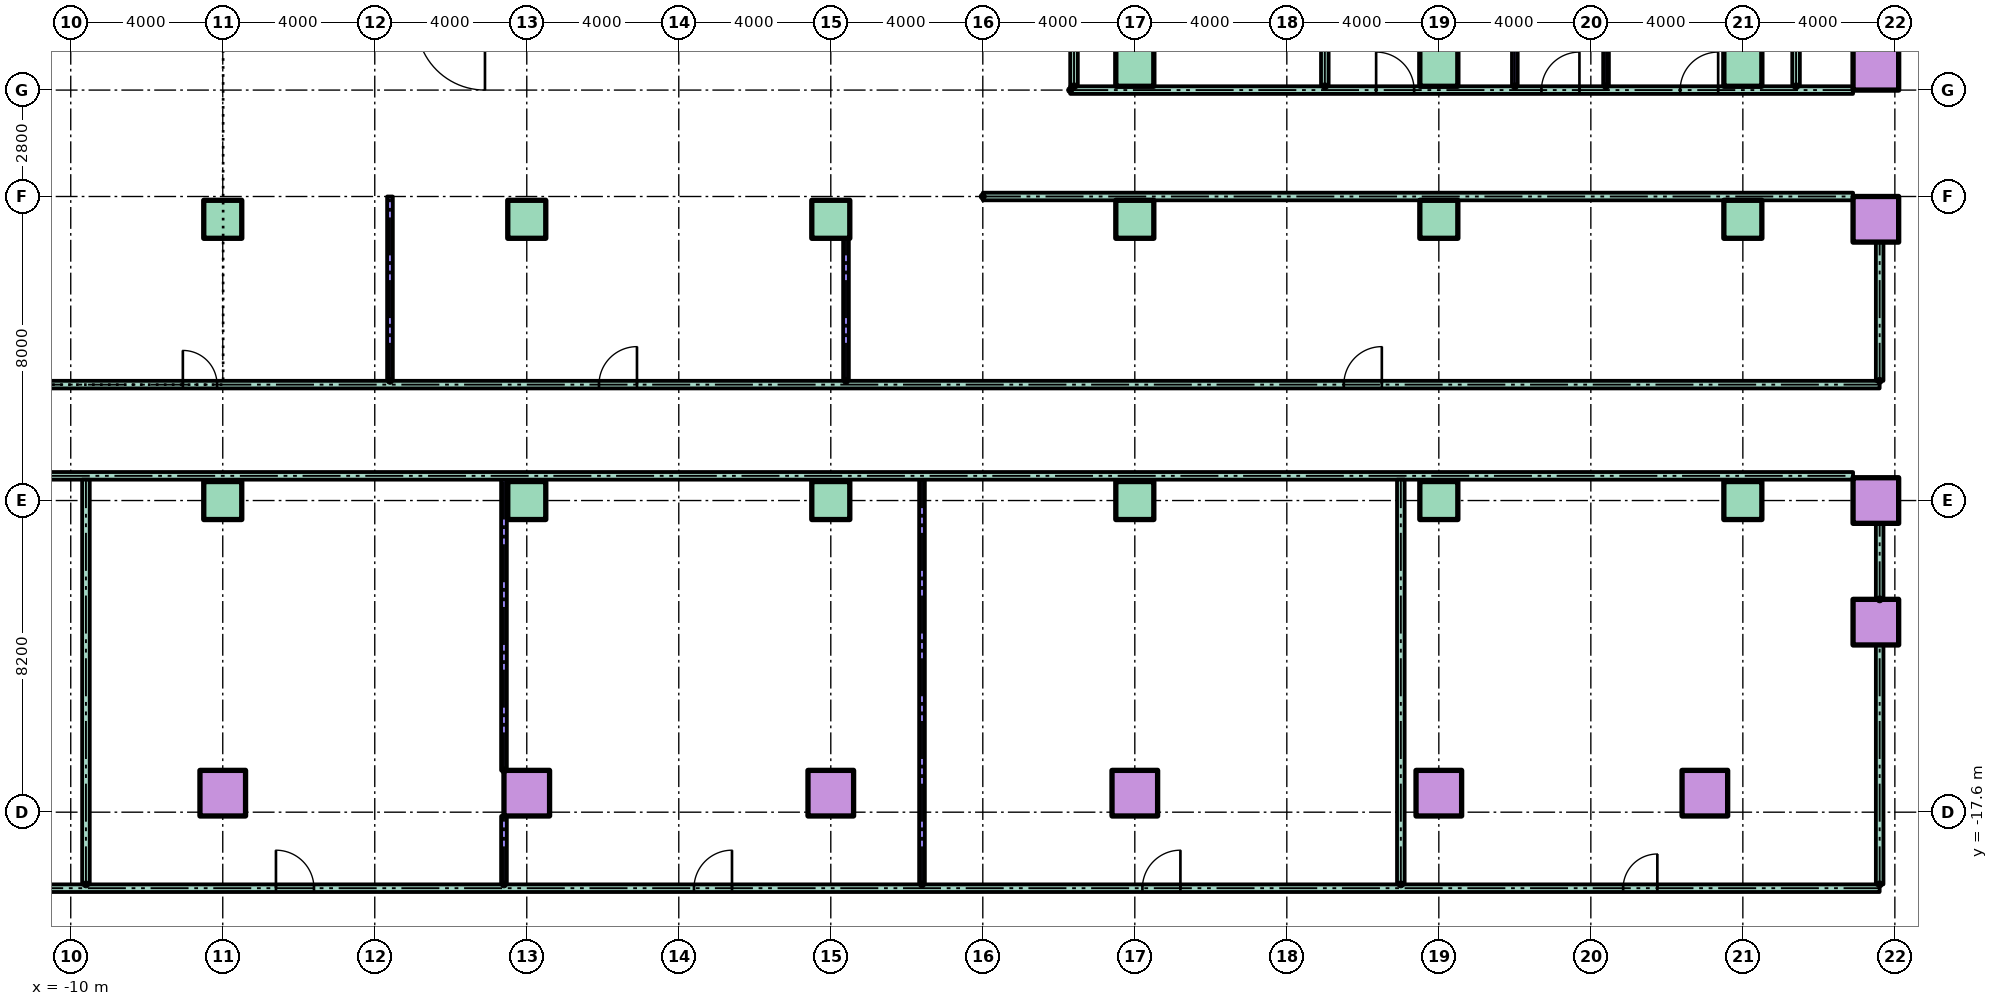
"""IFC4 building model, lengths in metres.
Left out: names, types, materials, properties, quantities, classifications, styles, units other than length and angle.
Written with IfcOpenShell. Run it as: python <this file> out.ifc"""

import sys

from ifc_helpers import new_model, si_unit, direction, frame, frame_2d, origin, origin_2d, place, context, subcontext, project, spatial, rectangle, hollow_rectangle, extrude, element, fill, save


model = new_model("IFC4")
c1 = context("Model", 3, precision=1e-05, world=origin(), true_north=direction((0.0, 1.0)))
c2 = subcontext(c1, "Body", "Model", "MODEL_VIEW")
j1 = project(units=[si_unit("LENGTHUNIT", "METRE"), si_unit("PLANEANGLEUNIT", "RADIAN")], contexts=[c1])
p1 = place(None, origin())
s1 = spatial("IfcSite", under=j1, at=p1, CompositionType="ELEMENT")
p2 = place(p1, origin())
s2 = spatial("IfcBuilding", under=s1, at=p2, CompositionType="ELEMENT")
p3 = place(p2, frame((0.0, 0.0, 18.0)))
s3 = spatial("IfcBuildingStorey", under=s2, at=p3, CompositionType="ELEMENT", Elevation=18.0)
for number, where in (
    (1, (-6.0, -17.1, 0.0)),
    (2, (2.0, -17.1, 0.0)),
    (3, (10.0, -17.1, 0.0)),
    (4, (18.0, -17.1, 0.0)),
    (5, (26.0, -17.1, 0.0)),
    (6, (33.0, -17.1, 0.0)),
    (7, (37.5, -12.6, 0.0)),
):
    element("IfcColumn", number, at=place(p3, frame(where)), inside=s3, PredefinedType="COLUMN", context=c2, shape_type="SweptSolid", body=[
        extrude(hollow_rectangle(XDim=1.2, YDim=1.2, WallThickness=0.06, at=origin_2d()), origin(), (0.0, 0.0, 1.0), 4.0),
    ])
for number, where in (
    (8, (-6.0, -9.4, 0.0)),
    (9, (2.0, -9.4, 0.0)),
    (10, (10.0, -9.4, 0.0)),
    (11, (18.0, -9.4, 0.0)),
    (12, (26.0, -9.4, 0.0)),
    (13, (34.0, -9.4, 0.0)),
):
    element("IfcColumn", number, at=place(p3, frame(where)), inside=s3, PredefinedType="COLUMN", context=c2, shape_type="SweptSolid", body=[
        extrude(rectangle(XDim=1.0, YDim=1.0, at=origin_2d()), origin(), (0.0, 0.0, 1.0), 4.0),
    ])
p4 = place(p3, frame((37.5, -9.4, 0.0)))
e14 = element("IfcColumn", 14, at=p4, inside=s3, PredefinedType="COLUMN", context=c2, shape_type="SweptSolid", body=[
    extrude(hollow_rectangle(XDim=1.2, YDim=1.2, WallThickness=0.06, at=origin_2d()), origin(), (0.0, 0.0, 1.0), 4.0),
])
for number, where in (
    (15, (-6.0, -2.0, 0.0)),
    (16, (2.0, -2.0, 0.0)),
    (17, (10.0, -2.0, 0.0)),
    (18, (18.0, -2.0, 0.0)),
    (19, (26.0, -2.0, 0.0)),
    (20, (34.0, -2.0, 0.0)),
):
    element("IfcColumn", number, at=place(p3, frame(where)), inside=s3, PredefinedType="COLUMN", context=c2, shape_type="SweptSolid", body=[
        extrude(rectangle(XDim=1.0, YDim=1.0, at=origin_2d()), origin(), (0.0, 0.0, 1.0), 4.0),
    ])
p5 = place(p3, frame((37.5, -2.0, 0.0)))
e21 = element("IfcColumn", 21, at=p5, inside=s3, PredefinedType="COLUMN", context=c2, shape_type="SweptSolid", body=[
    extrude(hollow_rectangle(XDim=1.2, YDim=1.2, WallThickness=0.06, at=origin_2d()), origin(), (0.0, 0.0, 1.0), 4.0),
])
for number, where in (
    (22, (18.0, 2.0, 0.0)),
    (23, (26.0, 2.0, 0.0)),
    (24, (34.0, 2.0, 0.0)),
):
    element("IfcColumn", number, at=place(p3, frame(where)), inside=s3, PredefinedType="COLUMN", context=c2, shape_type="SweptSolid", body=[
        extrude(rectangle(XDim=1.0, YDim=1.0, at=origin_2d()), origin(), (0.0, 0.0, 1.0), 4.0),
    ])
p6 = place(p3, frame((37.5, 2.0, 0.0)))
e25 = element("IfcColumn", 25, at=p6, inside=s3, PredefinedType="COLUMN", context=c2, shape_type="SweptSolid", body=[
    extrude(hollow_rectangle(XDim=1.2, YDim=1.2, WallThickness=0.06, at=origin_2d()), origin(), (0.0, 0.0, 1.0), 4.0),
])
p7 = place(p3, frame((-37.6, -19.6, 0.0)))
e26 = element("IfcWall", 26, at=p7, inside=s3, PredefinedType="PARTITIONING", context=c2, shape_type="SweptSolid", body=[
    extrude(rectangle(XDim=75.2, YDim=0.2, at=frame_2d((37.6, 0.0))), origin(), (0.0, 0.0, 1.0), 3.7),
])
p8 = place(p7, frame((2.58, 0.0, 0.0)))
e27 = element("IfcOpeningElement", 27, at=p8, cuts=e26, PredefinedType="OPENING", context=c2, shape_type="SweptSolid", body=[
    extrude(rectangle(XDim=1.0, YDim=2.1, at=frame_2d((0.5, 1.05))), frame((0.0, 0.11, 0.0), z_axis=(0.0, -1.0, 0.0), x_axis=(1.0, 0.0, 0.0)), (0.0, 0.0, 1.0), 0.22),
])
p9 = place(p7, frame((10.42, 0.0, 0.0)))
e28 = element("IfcOpeningElement", 28, at=p9, cuts=e26, PredefinedType="OPENING", context=c2, shape_type="SweptSolid", body=[
    extrude(rectangle(XDim=1.0, YDim=2.1, at=frame_2d((0.5, 1.05))), frame((0.0, 0.11, 0.0), z_axis=(0.0, -1.0, 0.0), x_axis=(1.0, 0.0, 0.0)), (0.0, 0.0, 1.0), 0.22),
])
p10 = place(p7, frame((16.58, 0.0, 0.0)))
e29 = element("IfcOpeningElement", 29, at=p10, cuts=e26, PredefinedType="OPENING", context=c2, shape_type="SweptSolid", body=[
    extrude(rectangle(XDim=1.0, YDim=2.1, at=frame_2d((0.5, 1.05))), frame((0.0, 0.11, 0.0), z_axis=(0.0, -1.0, 0.0), x_axis=(1.0, 0.0, 0.0)), (0.0, 0.0, 1.0), 0.22),
])
p11 = place(p7, frame((24.42, 0.0, 0.0)))
e30 = element("IfcOpeningElement", 30, at=p11, cuts=e26, PredefinedType="OPENING", context=c2, shape_type="SweptSolid", body=[
    extrude(rectangle(XDim=1.0, YDim=2.1, at=frame_2d((0.5, 1.05))), frame((0.0, 0.11, 0.0), z_axis=(0.0, -1.0, 0.0), x_axis=(1.0, 0.0, 0.0)), (0.0, 0.0, 1.0), 0.22),
])
p12 = place(p7, frame((33.0, 0.0, 0.0)))
e31 = element("IfcOpeningElement", 31, at=p12, cuts=e26, PredefinedType="OPENING", context=c2, shape_type="SweptSolid", body=[
    extrude(rectangle(XDim=1.0, YDim=2.1, at=frame_2d((0.5, 1.05))), frame((0.0, 0.11, 0.0), z_axis=(0.0, -1.0, 0.0), x_axis=(1.0, 0.0, 0.0)), (0.0, 0.0, 1.0), 0.22),
])
p13 = place(p7, frame((44.0, 0.0, 0.0)))
e32 = element("IfcOpeningElement", 32, at=p13, cuts=e26, PredefinedType="OPENING", context=c2, shape_type="SweptSolid", body=[
    extrude(rectangle(XDim=1.0, YDim=2.1, at=frame_2d((0.5, 1.05))), frame((0.0, 0.11, 0.0), z_axis=(0.0, -1.0, 0.0), x_axis=(1.0, 0.0, 0.0)), (0.0, 0.0, 1.0), 0.22),
])
p14 = place(p7, frame((55.8, 0.0, 0.0)))
e33 = element("IfcOpeningElement", 33, at=p14, cuts=e26, PredefinedType="OPENING", context=c2, shape_type="SweptSolid", body=[
    extrude(rectangle(XDim=1.0, YDim=2.1, at=frame_2d((0.5, 1.05))), frame((0.0, 0.11, 0.0), z_axis=(0.0, -1.0, 0.0), x_axis=(1.0, 0.0, 0.0)), (0.0, 0.0, 1.0), 0.22),
])
p15 = place(p7, frame((68.45, 0.0, 0.0)))
e34 = element("IfcOpeningElement", 34, at=p15, cuts=e26, PredefinedType="OPENING", context=c2, shape_type="SweptSolid", body=[
    extrude(rectangle(XDim=0.9, YDim=2.1, at=frame_2d((0.45, 1.05))), frame((0.0, 0.11, 0.0), z_axis=(0.0, -1.0, 0.0), x_axis=(1.0, 0.0, 0.0)), (0.0, 0.0, 1.0), 0.22),
])
p16 = place(p3, frame((-36.9, -8.75, 0.0)))
e35 = element("IfcWall", 35, at=p16, inside=s3, PredefinedType="PARTITIONING", context=c2, shape_type="SweptSolid", body=[
    extrude(rectangle(XDim=73.8, YDim=0.2, at=frame_2d((36.9, 0.0))), origin(), (0.0, 0.0, 1.0), 3.7),
])
p17 = place(p3, frame((-37.6, -6.35, 0.0)))
e36 = element("IfcWall", 36, at=p17, inside=s3, PredefinedType="PARTITIONING", context=c2, shape_type="SweptSolid", body=[
    extrude(rectangle(XDim=75.2, YDim=0.2, at=frame_2d((37.6, 0.0))), origin(), (0.0, 0.0, 1.0), 3.7),
])
p18 = place(p17, frame((7.5, 0.0, 0.0)))
e37 = element("IfcOpeningElement", 37, at=p18, cuts=e36, PredefinedType="OPENING", context=c2, shape_type="SweptSolid", body=[
    extrude(rectangle(XDim=1.0, YDim=2.1, at=frame_2d((0.5, 1.05))), frame((0.0, 0.11, 0.0), z_axis=(0.0, -1.0, 0.0), x_axis=(1.0, 0.0, 0.0)), (0.0, 0.0, 1.0), 0.22),
])
p19 = place(p17, frame((20.55, 0.0, 0.0)))
e38 = element("IfcOpeningElement", 38, at=p19, cuts=e36, PredefinedType="OPENING", context=c2, shape_type="SweptSolid", body=[
    extrude(rectangle(XDim=0.9, YDim=2.1, at=frame_2d((0.45, 1.05))), frame((0.0, 0.11, 0.0), z_axis=(0.0, -1.0, 0.0), x_axis=(1.0, 0.0, 0.0)), (0.0, 0.0, 1.0), 0.22),
])
p20 = place(p17, frame((30.55, 0.0, 0.0)))
e39 = element("IfcOpeningElement", 39, at=p20, cuts=e36, PredefinedType="OPENING", context=c2, shape_type="SweptSolid", body=[
    extrude(rectangle(XDim=0.9, YDim=2.1, at=frame_2d((0.45, 1.05))), frame((0.0, 0.11, 0.0), z_axis=(0.0, -1.0, 0.0), x_axis=(1.0, 0.0, 0.0)), (0.0, 0.0, 1.0), 0.22),
])
p21 = place(p17, frame((41.5, 0.0, 0.0)))
e40 = element("IfcOpeningElement", 40, at=p21, cuts=e36, PredefinedType="OPENING", context=c2, shape_type="SweptSolid", body=[
    extrude(rectangle(XDim=1.0, YDim=2.1, at=frame_2d((0.5, 1.05))), frame((0.0, 0.11, 0.0), z_axis=(0.0, -1.0, 0.0), x_axis=(1.0, 0.0, 0.0)), (0.0, 0.0, 1.0), 0.22),
])
p22 = place(p17, frame((61.1, 0.0, 0.0)))
e41 = element("IfcOpeningElement", 41, at=p22, cuts=e36, PredefinedType="OPENING", context=c2, shape_type="SweptSolid", body=[
    extrude(rectangle(XDim=1.0, YDim=2.1, at=frame_2d((0.5, 1.05))), frame((0.0, 0.11, 0.0), z_axis=(0.0, -1.0, 0.0), x_axis=(1.0, 0.0, 0.0)), (0.0, 0.0, 1.0), 0.22),
])
p23 = place(p3, frame((14.0, -1.4, 0.0)))
e42 = element("IfcWall", 42, at=p23, inside=s3, PredefinedType="PARTITIONING", context=c2, shape_type="SweptSolid", body=[
    extrude(rectangle(XDim=22.9, YDim=0.2, at=frame_2d((11.45, 0.0))), origin(), (0.0, 0.0, 1.0), 3.7),
])
p24 = place(p3, frame((16.3, 1.4, 0.0)))
e43 = element("IfcWall", 43, at=p24, inside=s3, PredefinedType="PARTITIONING", context=c2, shape_type="SweptSolid", body=[
    extrude(rectangle(XDim=20.6, YDim=0.2, at=frame_2d((10.3, 0.0))), origin(), (0.0, 0.0, 1.0), 3.7),
])
p25 = place(p24, frame((8.05, 0.0, 0.0)))
e44 = element("IfcOpeningElement", 44, at=p25, cuts=e43, PredefinedType="OPENING", context=c2, shape_type="SweptSolid", body=[
    extrude(rectangle(XDim=1.0, YDim=2.1, at=frame_2d((0.5, 1.05))), frame((0.0, 0.11, 0.0), z_axis=(0.0, -1.0, 0.0), x_axis=(1.0, 0.0, 0.0)), (0.0, 0.0, 1.0), 0.22),
])
p26 = place(p24, frame((12.4, 0.0, 0.0)))
e45 = element("IfcOpeningElement", 45, at=p26, cuts=e43, PredefinedType="OPENING", context=c2, shape_type="SweptSolid", body=[
    extrude(rectangle(XDim=1.0, YDim=2.1, at=frame_2d((0.5, 1.05))), frame((0.0, 0.11, 0.0), z_axis=(0.0, -1.0, 0.0), x_axis=(1.0, 0.0, 0.0)), (0.0, 0.0, 1.0), 0.22),
])
p27 = place(p24, frame((16.05, 0.0, 0.0)))
e46 = element("IfcOpeningElement", 46, at=p27, cuts=e43, PredefinedType="OPENING", context=c2, shape_type="SweptSolid", body=[
    extrude(rectangle(XDim=1.0, YDim=2.1, at=frame_2d((0.5, 1.05))), frame((0.0, 0.11, 0.0), z_axis=(0.0, -1.0, 0.0), x_axis=(1.0, 0.0, 0.0)), (0.0, 0.0, 1.0), 0.22),
])
p28 = place(p3, frame((-9.6, -19.5, 0.0), z_axis=(0.0, 0.0, 1.0), x_axis=(0.0, 1.0, 0.0)))
e47 = element("IfcWall", 47, at=p28, inside=s3, PredefinedType="PARTITIONING", context=c2, shape_type="SweptSolid", body=[
    extrude(rectangle(XDim=10.65, YDim=0.2, at=frame_2d((5.325, 0.0))), origin(), (0.0, 0.0, 1.0), 3.7),
])
p29 = place(p3, frame((-1.6, -6.25, 0.0), z_axis=(0.0, 0.0, 1.0), x_axis=(0.0, 1.0, 0.0)))
e48 = element("IfcWall", 48, at=p29, inside=s3, PredefinedType="PARTITIONING", context=c2, shape_type="SweptSolid", body=[
    extrude(rectangle(XDim=4.85, YDim=0.15, at=frame_2d((2.425, 0.0))), origin(), (0.0, 0.0, 1.0), 3.7),
])
p30 = place(p3, frame((1.4, -19.5, 0.0), z_axis=(0.0, 0.0, 1.0), x_axis=(0.0, 1.0, 0.0)))
e49 = element("IfcWall", 49, at=p30, inside=s3, PredefinedType="PARTITIONING", context=c2, shape_type="SweptSolid", body=[
    extrude(rectangle(XDim=1.8, YDim=0.15, at=frame_2d((0.9, 0.0))), origin(), (0.0, 0.0, 1.0), 3.7),
])
p31 = place(p3, frame((1.4, -16.5, 0.0), z_axis=(0.0, 0.0, 1.0), x_axis=(0.0, 1.0, 0.0)))
e50 = element("IfcWall", 50, at=p31, inside=s3, PredefinedType="PARTITIONING", context=c2, shape_type="SweptSolid", body=[
    extrude(rectangle(XDim=7.65, YDim=0.15, at=frame_2d((3.825, 0.0))), origin(), (0.0, 0.0, 1.0), 3.7),
])
p32 = place(p3, frame((10.4, -6.25, 0.0), z_axis=(0.0, 0.0, 1.0), x_axis=(0.0, 1.0, 0.0)))
e51 = element("IfcWall", 51, at=p32, inside=s3, PredefinedType="PARTITIONING", context=c2, shape_type="SweptSolid", body=[
    extrude(rectangle(XDim=3.75, YDim=0.15, at=frame_2d((1.875, 0.0))), origin(), (0.0, 0.0, 1.0), 3.7),
])
p33 = place(p3, frame((12.4, -19.5, 0.0), z_axis=(0.0, 0.0, 1.0), x_axis=(0.0, 1.0, 0.0)))
e52 = element("IfcWall", 52, at=p33, inside=s3, PredefinedType="PARTITIONING", context=c2, shape_type="SweptSolid", body=[
    extrude(rectangle(XDim=10.65, YDim=0.15, at=frame_2d((5.325, 0.0))), origin(), (0.0, 0.0, 1.0), 3.7),
])
p34 = place(p3, frame((16.4, 1.5, 0.0), z_axis=(0.0, 0.0, 1.0), x_axis=(0.0, 1.0, 0.0)))
e53 = element("IfcWall", 53, at=p34, inside=s3, PredefinedType="PARTITIONING", context=c2, shape_type="SweptSolid", body=[
    extrude(rectangle(XDim=7.0, YDim=0.2, at=frame_2d((3.5, 0.0))), origin(), (0.0, 0.0, 1.0), 3.7),
])
p35 = place(p34, frame((3.05, 0.0, 0.0)))
e54 = element("IfcOpeningElement", 54, at=p35, cuts=e53, PredefinedType="OPENING", context=c2, shape_type="SweptSolid", body=[
    extrude(rectangle(XDim=0.9, YDim=2.1, at=frame_2d((0.45, 1.05))), frame((0.0, 0.11, 0.0), z_axis=(0.0, -1.0, 0.0), x_axis=(1.0, 0.0, 0.0)), (0.0, 0.0, 1.0), 0.22),
])
p36 = place(p3, frame((23.0, 1.5, 0.0), z_axis=(0.0, 0.0, 1.0), x_axis=(0.0, 1.0, 0.0)))
e55 = element("IfcWall", 55, at=p36, inside=s3, PredefinedType="PARTITIONING", context=c2, shape_type="SweptSolid", body=[
    extrude(rectangle(XDim=7.0, YDim=0.2, at=frame_2d((3.5, 0.0))), origin(), (0.0, 0.0, 1.0), 3.7),
])
p37 = place(p3, frame((25.0, -19.5, 0.0), z_axis=(0.0, 0.0, 1.0), x_axis=(0.0, 1.0, 0.0)))
e56 = element("IfcWall", 56, at=p37, inside=s3, PredefinedType="PARTITIONING", context=c2, shape_type="SweptSolid", body=[
    extrude(rectangle(XDim=10.65, YDim=0.2, at=frame_2d((5.325, 0.0))), origin(), (0.0, 0.0, 1.0), 3.7),
])
for number, where, z_axis, x_axis in (
    (57, (28.0, 1.5, 0.0), (0.0, 0.0, 1.0), (0.0, 1.0, 0.0)),
    (58, (30.4, 1.5, 0.0), (0.0, 0.0, 1.0), (0.0, 1.0, 0.0)),
):
    element("IfcWall", number, at=place(p3, frame(where, z_axis=z_axis, x_axis=x_axis)), inside=s3, PredefinedType="PARTITIONING", context=c2, shape_type="SweptSolid", body=[
        extrude(rectangle(XDim=7.0, YDim=0.15, at=frame_2d((3.5, 0.0))), origin(), (0.0, 0.0, 1.0), 3.7),
    ])
p38 = place(p3, frame((35.4, 1.5, 0.0), z_axis=(0.0, 0.0, 1.0), x_axis=(0.0, 1.0, 0.0)))
e59 = element("IfcWall", 59, at=p38, inside=s3, PredefinedType="PARTITIONING", context=c2, shape_type="SweptSolid", body=[
    extrude(rectangle(XDim=7.0, YDim=0.2, at=frame_2d((3.5, 0.0))), origin(), (0.0, 0.0, 1.0), 3.7),
])
p39 = place(p3, frame((37.6, -19.5, 0.0), z_axis=(0.0, 0.0, 1.0), x_axis=(0.0, 1.0, 0.0)))
e60 = element("IfcWall", 60, at=p39, inside=s3, PredefinedType="PARTITIONING", context=c2, shape_type="SweptSolid", body=[
    extrude(rectangle(XDim=6.3, YDim=0.2, at=frame_2d((3.15, 0.0))), origin(), (0.0, 0.0, 1.0), 3.7),
])
p40 = place(p3, frame((37.6, -12.0, 0.0), z_axis=(0.0, 0.0, 1.0), x_axis=(0.0, 1.0, 0.0)))
e61 = element("IfcWall", 61, at=p40, inside=s3, PredefinedType="PARTITIONING", context=c2, shape_type="SweptSolid", body=[
    extrude(rectangle(XDim=2.0, YDim=0.2, at=frame_2d((1.0, 0.0))), origin(), (0.0, 0.0, 1.0), 3.7),
])
p41 = place(p3, frame((37.6, -6.25, 0.0), z_axis=(0.0, 0.0, 1.0), x_axis=(0.0, 1.0, 0.0)))
e62 = element("IfcWall", 62, at=p41, inside=s3, PredefinedType="PARTITIONING", context=c2, shape_type="SweptSolid", body=[
    extrude(rectangle(XDim=3.65, YDim=0.2, at=frame_2d((1.825, 0.0))), origin(), (0.0, 0.0, 1.0), 3.7),
])
p42 = place(p12, origin())
e63 = element("IfcDoor", 63, at=p42, inside=s3, OperationType="SINGLE_SWING_LEFT", PredefinedType="DOOR", context=c2, shape_type="SweptSolid", body=[
    extrude(rectangle(XDim=1.0, YDim=2.1, at=frame_2d((0.5, 1.05))), frame((0.0, 0.025, 0.0), z_axis=(0.0, -1.0, 0.0), x_axis=(1.0, 0.0, 0.0)), (0.0, 0.0, 1.0), 0.05),
])
fill(e31, e63)
p43 = place(p13, origin())
e64 = element("IfcDoor", 64, at=p43, inside=s3, OperationType="SINGLE_SWING_RIGHT", PredefinedType="DOOR", context=c2, shape_type="SweptSolid", body=[
    extrude(rectangle(XDim=1.0, YDim=2.1, at=frame_2d((0.5, 1.05))), frame((0.0, 0.025, 0.0), z_axis=(0.0, -1.0, 0.0), x_axis=(1.0, 0.0, 0.0)), (0.0, 0.0, 1.0), 0.05),
])
fill(e32, e64)
p44 = place(p14, origin())
e65 = element("IfcDoor", 65, at=p44, inside=s3, OperationType="SINGLE_SWING_RIGHT", PredefinedType="DOOR", context=c2, shape_type="SweptSolid", body=[
    extrude(rectangle(XDim=1.0, YDim=2.1, at=frame_2d((0.5, 1.05))), frame((0.0, 0.025, 0.0), z_axis=(0.0, -1.0, 0.0), x_axis=(1.0, 0.0, 0.0)), (0.0, 0.0, 1.0), 0.05),
])
fill(e33, e65)
p45 = place(p15, origin())
e66 = element("IfcDoor", 66, at=p45, inside=s3, OperationType="SINGLE_SWING_RIGHT", PredefinedType="DOOR", context=c2, shape_type="SweptSolid", body=[
    extrude(rectangle(XDim=0.9, YDim=2.1, at=frame_2d((0.45, 1.05))), frame((0.0, 0.025, 0.0), z_axis=(0.0, -1.0, 0.0), x_axis=(1.0, 0.0, 0.0)), (0.0, 0.0, 1.0), 0.05),
])
fill(e34, e66)
p46 = place(p20, origin())
e67 = element("IfcDoor", 67, at=p46, inside=s3, OperationType="SINGLE_SWING_LEFT", PredefinedType="DOOR", context=c2, shape_type="SweptSolid", body=[
    extrude(rectangle(XDim=0.9, YDim=2.1, at=frame_2d((0.45, 1.05))), frame((0.0, 0.025, 0.0), z_axis=(0.0, -1.0, 0.0), x_axis=(1.0, 0.0, 0.0)), (0.0, 0.0, 1.0), 0.05),
])
fill(e39, e67)
p47 = place(p21, origin())
e68 = element("IfcDoor", 68, at=p47, inside=s3, OperationType="SINGLE_SWING_RIGHT", PredefinedType="DOOR", context=c2, shape_type="SweptSolid", body=[
    extrude(rectangle(XDim=1.0, YDim=2.1, at=frame_2d((0.5, 1.05))), frame((0.0, 0.025, 0.0), z_axis=(0.0, -1.0, 0.0), x_axis=(1.0, 0.0, 0.0)), (0.0, 0.0, 1.0), 0.05),
])
fill(e40, e68)
p48 = place(p22, origin())
e69 = element("IfcDoor", 69, at=p48, inside=s3, OperationType="SINGLE_SWING_RIGHT", PredefinedType="DOOR", context=c2, shape_type="SweptSolid", body=[
    extrude(rectangle(XDim=1.0, YDim=2.1, at=frame_2d((0.5, 1.05))), frame((0.0, 0.025, 0.0), z_axis=(0.0, -1.0, 0.0), x_axis=(1.0, 0.0, 0.0)), (0.0, 0.0, 1.0), 0.05),
])
fill(e41, e69)
p49 = place(p25, origin())
e70 = element("IfcDoor", 70, at=p49, inside=s3, OperationType="SINGLE_SWING_LEFT", PredefinedType="DOOR", context=c2, shape_type="SweptSolid", body=[
    extrude(rectangle(XDim=1.0, YDim=2.1, at=frame_2d((0.5, 1.05))), frame((0.0, 0.025, 0.0), z_axis=(0.0, -1.0, 0.0), x_axis=(1.0, 0.0, 0.0)), (0.0, 0.0, 1.0), 0.05),
])
fill(e44, e70)
p50 = place(p26, origin())
e71 = element("IfcDoor", 71, at=p50, inside=s3, OperationType="SINGLE_SWING_RIGHT", PredefinedType="DOOR", context=c2, shape_type="SweptSolid", body=[
    extrude(rectangle(XDim=1.0, YDim=2.1, at=frame_2d((0.5, 1.05))), frame((0.0, 0.025, 0.0), z_axis=(0.0, -1.0, 0.0), x_axis=(1.0, 0.0, 0.0)), (0.0, 0.0, 1.0), 0.05),
])
fill(e45, e71)
p51 = place(p27, origin())
e72 = element("IfcDoor", 72, at=p51, inside=s3, OperationType="SINGLE_SWING_RIGHT", PredefinedType="DOOR", context=c2, shape_type="SweptSolid", body=[
    extrude(rectangle(XDim=1.0, YDim=2.1, at=frame_2d((0.5, 1.05))), frame((0.0, 0.025, 0.0), z_axis=(0.0, -1.0, 0.0), x_axis=(1.0, 0.0, 0.0)), (0.0, 0.0, 1.0), 0.05),
])
fill(e46, e72)
save(model, sys.argv[1])
